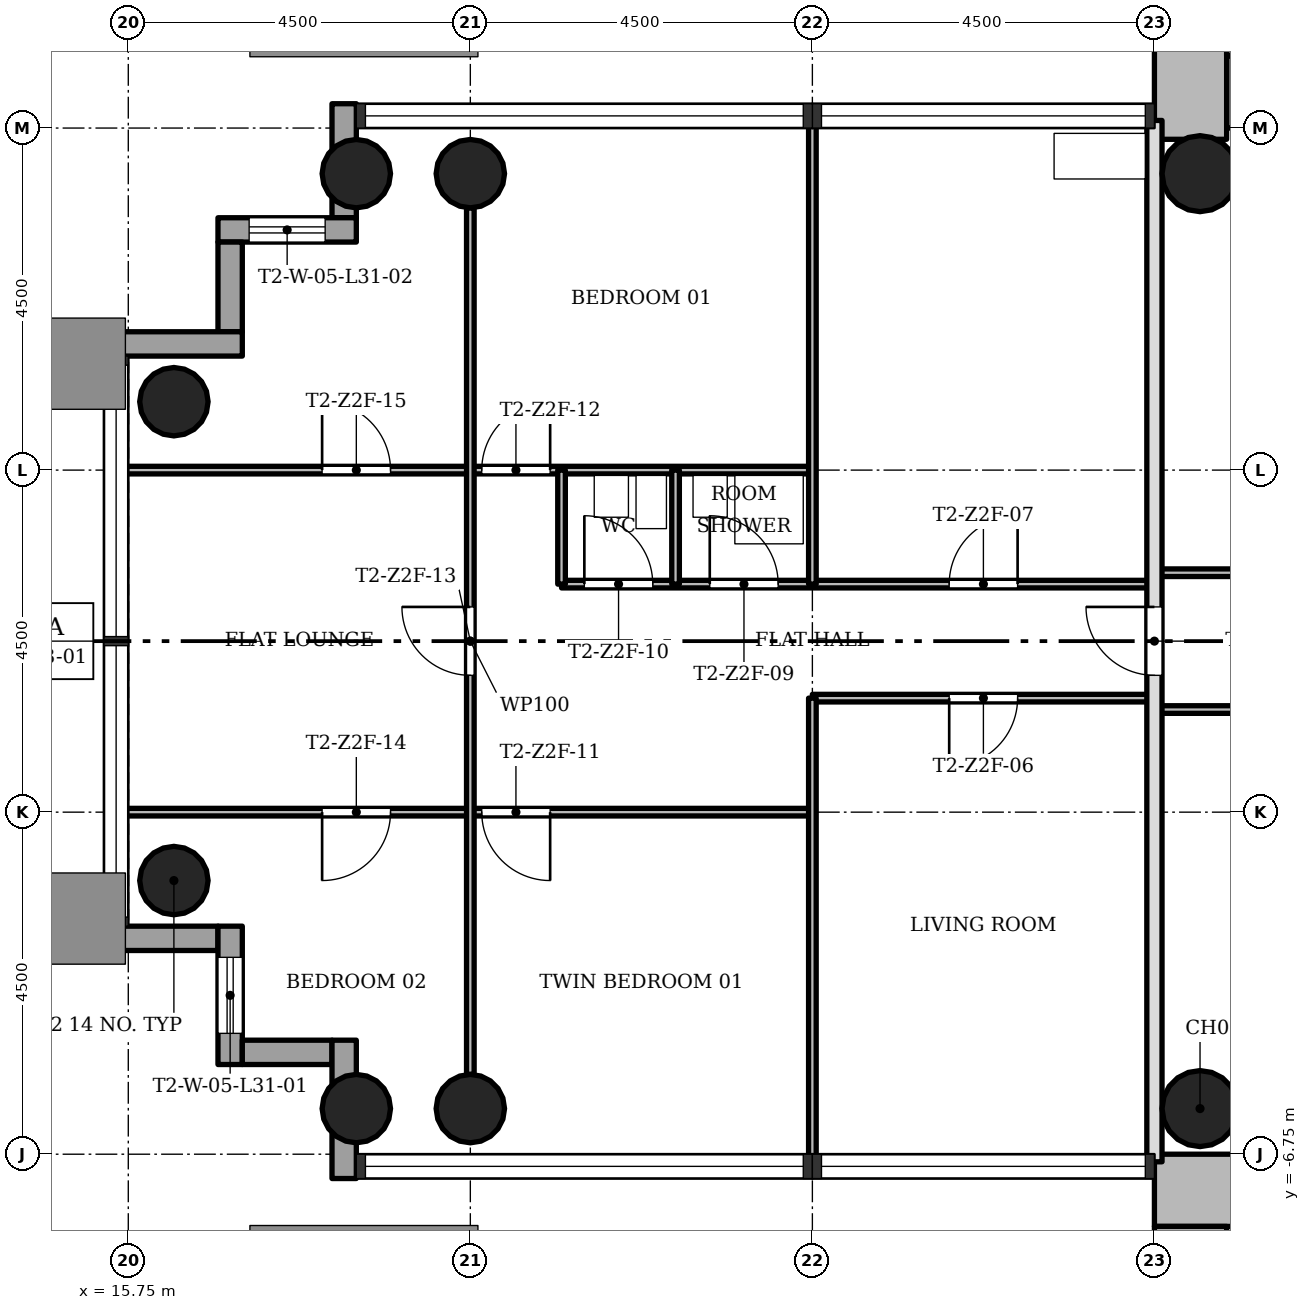
"""IFC4 building model, lengths in metres.
Left out: names, types, materials, properties, quantities, classifications, styles, units other than length and angle.
Written with IfcOpenShell. Run it as: python <this file> out.ifc"""

import sys

from ifc_helpers import new_model, si_unit, direction, frame, frame_2d, origin, origin_2d, place, context, subcontext, project, spatial, rectangle, hollow_circle, extrude, element, fill, save


model = new_model("IFC4")
c1 = context("Model", 3, precision=1e-05, world=origin(), true_north=direction((0.0, 1.0)))
c2 = subcontext(c1, "Body", "Model", "MODEL_VIEW")
j1 = project(units=[si_unit("LENGTHUNIT", "METRE"), si_unit("PLANEANGLEUNIT", "RADIAN")], contexts=[c1])
p1 = place(None, origin())
s1 = spatial("IfcSite", under=j1, at=p1, CompositionType="ELEMENT")
p2 = place(p1, origin())
s2 = spatial("IfcBuilding", under=s1, at=p2, CompositionType="ELEMENT")
p3 = place(p2, frame((0.0, 0.0, 114.0)))
s3 = spatial("IfcBuildingStorey", under=s2, at=p3, CompositionType="ELEMENT", Elevation=114.0)
p4 = place(p3, frame((30.2, 7.225, 0.0), z_axis=(0.0, 0.0, 1.0), x_axis=(1.0, 0.0, 0.0)))
e1 = element("IfcWall", 1, at=p4, inside=s3, PredefinedType="SHEAR", context=c2, shape_type="SweptSolid", body=[
    extrude(rectangle(XDim=12.55, YDim=0.95, at=frame_2d((6.275, 0.0))), origin(), (0.0, 0.0, 1.0), 3.4),
])
p5 = place(p4, frame((4.9, 0.0, 0.0)))
e2 = element("IfcOpeningElement", 2, at=p5, cuts=e1, PredefinedType="OPENING", context=c2, shape_type="SweptSolid", body=[
    extrude(rectangle(XDim=1.8, YDim=2.1, at=frame_2d((0.9, 1.05))), frame((0.0, 0.485, 0.0), z_axis=(0.0, -1.0, 0.0), x_axis=(1.0, 0.0, 0.0)), (0.0, 0.0, 1.0), 0.97),
])
p6 = place(p3, frame((29.725, 15.298, 0.0), z_axis=(0.0, 0.0, 1.0), x_axis=(0.0, -1.0, 0.0)))
e3 = element("IfcWall", 3, at=p6, inside=s3, PredefinedType="SHEAR", context=c2, shape_type="SweptSolid", body=[
    extrude(rectangle(XDim=8.696, YDim=0.95, at=frame_2d((4.348, 0.0))), origin(), (0.0, 0.0, 1.0), 3.4),
])
p7 = place(p3, frame((41.8, -7.225, 0.0), z_axis=(0.0, 0.0, 1.0), x_axis=(-1.0, 0.0, 0.0)))
e4 = element("IfcWall", 4, at=p7, inside=s3, PredefinedType="SHEAR", context=c2, shape_type="SweptSolid", body=[
    extrude(rectangle(XDim=12.55, YDim=0.95, at=frame_2d((6.275, 0.0))), origin(), (0.0, 0.0, 1.0), 3.4),
])
p8 = place(p7, frame((4.9, 0.0, 0.0)))
e5 = element("IfcOpeningElement", 5, at=p8, cuts=e4, PredefinedType="OPENING", context=c2, shape_type="SweptSolid", body=[
    extrude(rectangle(XDim=1.8, YDim=2.1, at=frame_2d((0.9, 1.05))), frame((0.0, 0.485, 0.0), z_axis=(0.0, -1.0, 0.0), x_axis=(1.0, 0.0, 0.0)), (0.0, 0.0, 1.0), 0.97),
])
p9 = place(p3, frame((29.725, -7.7, 0.0), z_axis=(0.0, 0.0, 1.0), x_axis=(0.0, -1.0, 0.0)))
e6 = element("IfcWall", 6, at=p9, inside=s3, PredefinedType="SHEAR", context=c2, shape_type="SweptSolid", body=[
    extrude(rectangle(XDim=8.05, YDim=0.95, at=frame_2d((4.025, 0.0))), origin(), (0.0, 0.0, 1.0), 3.4),
])
for number, where, z_axis, x_axis in (
    (7, (20.25, 6.15, 0.0), (0.0, 0.0, 1.0), (1.0, 0.0, 0.0)),
    (8, (20.25, -6.15, 0.0), (0.0, 0.0, 1.0), (1.0, 0.0, 0.0)),
    (9, (18.75, 6.15, 0.0), (0.0, 0.0, 1.0), (1.0, 0.0, 0.0)),
    (10, (18.75, -6.15, 0.0), (0.0, 0.0, 1.0), (1.0, 0.0, 0.0)),
    (11, (16.35, 3.15, 0.0), (0.0, 0.0, 1.0), (1.0, 0.0, 0.0)),
    (12, (16.35, -3.15, 0.0), (0.0, 0.0, 1.0), (1.0, 0.0, 0.0)),
):
    element("IfcColumn", number, at=place(p3, frame(where, z_axis=z_axis, x_axis=x_axis)), inside=s3, PredefinedType="COLUMN", context=c2, shape_type="SweptSolid", body=[
        extrude(hollow_circle(Radius=0.45, WallThickness=0.032, at=origin_2d()), origin(), (0.0, 0.0, 1.0), 3.4),
    ])
for number, where, z_axis, x_axis in (
    (13, (29.85, 6.15, 0.0), (0.0, 0.0, 1.0), (1.0, 0.0, 0.0)),
    (14, (29.85, -6.15, 0.0), (0.0, 0.0, 1.0), (1.0, 0.0, 0.0)),
):
    element("IfcColumn", number, at=place(p3, frame(where, z_axis=z_axis, x_axis=x_axis)), inside=s3, PredefinedType="COLUMN", context=c2, shape_type="SweptSolid", body=[
        extrude(hollow_circle(Radius=0.5, WallThickness=0.036, at=origin_2d()), origin(), (0.0, 0.0, 1.0), 3.4),
    ])
p10 = place(p3, frame((18.59, 7.07, -0.3), z_axis=(0.0, 0.0, 1.0), x_axis=(0.0, -1.0, 0.0)))
e15 = element("IfcWall", 15, at=p10, inside=s3, PredefinedType="STANDARD", context=c2, shape_type="SweptSolid", body=[
    extrude(rectangle(XDim=1.5, YDim=0.32, at=frame_2d((0.75, 0.0))), origin(), (0.0, 0.0, 1.0), 3.4),
])
p11 = place(p3, frame((18.75, 5.41, -0.3), z_axis=(0.0, 0.0, 1.0), x_axis=(-1.0, 0.0, 0.0)))
e16 = element("IfcWall", 16, at=p11, inside=s3, PredefinedType="STANDARD", context=c2, shape_type="SweptSolid", body=[
    extrude(rectangle(XDim=1.82, YDim=0.32, at=frame_2d((0.91, 0.0))), origin(), (0.0, 0.0, 1.0), 3.4),
])
p12 = place(p11, frame((0.41, 0.0, 1.2)))
e17 = element("IfcOpeningElement", 17, at=p12, cuts=e16, PredefinedType="OPENING", context=c2, shape_type="SweptSolid", body=[
    extrude(rectangle(XDim=1.0, YDim=1.5, at=frame_2d((0.5, 0.75))), frame((0.0, 0.17, 0.0), z_axis=(0.0, -1.0, 0.0), x_axis=(1.0, 0.0, 0.0)), (0.0, 0.0, 1.0), 0.34),
])
p13 = place(p3, frame((17.09, 5.25, -0.3), z_axis=(0.0, 0.0, 1.0), x_axis=(0.0, -1.0, 0.0)))
e18 = element("IfcWall", 18, at=p13, inside=s3, PredefinedType="STANDARD", context=c2, shape_type="SweptSolid", body=[
    extrude(rectangle(XDim=1.18, YDim=0.32, at=frame_2d((0.59, 0.0))), origin(), (0.0, 0.0, 1.0), 3.4),
])
p14 = place(p3, frame((17.25, 3.91, -0.3), z_axis=(0.0, 0.0, 1.0), x_axis=(-1.0, 0.0, 0.0)))
e19 = element("IfcWall", 19, at=p14, inside=s3, PredefinedType="STANDARD", context=c2, shape_type="SweptSolid", body=[
    extrude(rectangle(XDim=1.82, YDim=0.32, at=frame_2d((0.91, 0.0))), origin(), (0.0, 0.0, 1.0), 3.4),
])
p15 = place(p3, frame((15.43, -3.91, -0.3), z_axis=(0.0, 0.0, 1.0), x_axis=(1.0, 0.0, 0.0)))
e20 = element("IfcWall", 20, at=p15, inside=s3, PredefinedType="STANDARD", context=c2, shape_type="SweptSolid", body=[
    extrude(rectangle(XDim=1.5, YDim=0.32, at=frame_2d((0.75, 0.0))), origin(), (0.0, 0.0, 1.0), 3.4),
])
p16 = place(p3, frame((17.09, -3.75, -0.3), z_axis=(0.0, 0.0, 1.0), x_axis=(0.0, -1.0, 0.0)))
e21 = element("IfcWall", 21, at=p16, inside=s3, PredefinedType="STANDARD", context=c2, shape_type="SweptSolid", body=[
    extrude(rectangle(XDim=1.82, YDim=0.32, at=frame_2d((0.91, 0.0))), origin(), (0.0, 0.0, 1.0), 3.4),
])
p17 = place(p16, frame((0.41, 0.0, 1.2)))
e22 = element("IfcOpeningElement", 22, at=p17, cuts=e21, PredefinedType="OPENING", context=c2, shape_type="SweptSolid", body=[
    extrude(rectangle(XDim=1.0, YDim=1.5, at=frame_2d((0.5, 0.75))), frame((0.0, 0.17, 0.0), z_axis=(0.0, -1.0, 0.0), x_axis=(1.0, 0.0, 0.0)), (0.0, 0.0, 1.0), 0.34),
])
p18 = place(p3, frame((17.25, -5.41, -0.3), z_axis=(0.0, 0.0, 1.0), x_axis=(1.0, 0.0, 0.0)))
e23 = element("IfcWall", 23, at=p18, inside=s3, PredefinedType="STANDARD", context=c2, shape_type="SweptSolid", body=[
    extrude(rectangle(XDim=1.18, YDim=0.32, at=frame_2d((0.59, 0.0))), origin(), (0.0, 0.0, 1.0), 3.4),
])
p19 = place(p3, frame((18.59, -5.25, -0.3), z_axis=(0.0, 0.0, 1.0), x_axis=(0.0, -1.0, 0.0)))
e24 = element("IfcWall", 24, at=p19, inside=s3, PredefinedType="STANDARD", context=c2, shape_type="SweptSolid", body=[
    extrude(rectangle(XDim=1.82, YDim=0.32, at=frame_2d((0.91, 0.0))), origin(), (0.0, 0.0, 1.0), 3.4),
])
p20 = place(p3, frame((24.75, -2.25, 0.0), z_axis=(0.0, 0.0, 1.0), x_axis=(-1.0, 0.0, 0.0)))
e25 = element("IfcWall", 25, at=p20, inside=s3, PredefinedType="PARTITIONING", context=c2, shape_type="SweptSolid", body=[
    extrude(rectangle(XDim=9.1, YDim=0.1, at=frame_2d((4.55, 0.0))), origin(), (0.0, 0.0, 1.0), 3.0),
])
p21 = place(p20, frame((3.45, 0.0, 0.0)))
e26 = element("IfcOpeningElement", 26, at=p21, cuts=e25, PredefinedType="OPENING", context=c2, shape_type="SweptSolid", body=[
    extrude(rectangle(XDim=0.9, YDim=2.1, at=frame_2d((0.45, 1.05))), frame((0.0, 0.06, 0.0), z_axis=(0.0, -1.0, 0.0), x_axis=(1.0, 0.0, 0.0)), (0.0, 0.0, 1.0), 0.12),
])
p22 = place(p20, frame((5.55, 0.0, 0.0)))
e27 = element("IfcOpeningElement", 27, at=p22, cuts=e25, PredefinedType="OPENING", context=c2, shape_type="SweptSolid", body=[
    extrude(rectangle(XDim=0.9, YDim=2.1, at=frame_2d((0.45, 1.05))), frame((0.0, 0.06, 0.0), z_axis=(0.0, -1.0, 0.0), x_axis=(1.0, 0.0, 0.0)), (0.0, 0.0, 1.0), 0.12),
])
p23 = place(p3, frame((34.5, -0.9, 0.0), z_axis=(0.0, 0.0, 1.0), x_axis=(-1.0, 0.0, 0.0)))
e28 = element("IfcWall", 28, at=p23, inside=s3, PredefinedType="PARTITIONING", context=c2, shape_type="SweptSolid", body=[
    extrude(rectangle(XDim=5.25, YDim=0.1, at=frame_2d((2.625, 0.0))), origin(), (0.0, 0.0, 1.0), 3.0),
])
p24 = place(p3, frame((29.25, -0.75, 0.0), z_axis=(0.0, 0.0, 1.0), x_axis=(-1.0, 0.0, 0.0)))
e29 = element("IfcWall", 29, at=p24, inside=s3, PredefinedType="PARTITIONING", context=c2, shape_type="SweptSolid", body=[
    extrude(rectangle(XDim=4.5, YDim=0.1, at=frame_2d((2.25, 0.0))), origin(), (0.0, 0.0, 1.0), 3.0),
])
p25 = place(p24, frame((1.8, 0.0, 0.0)))
e30 = element("IfcOpeningElement", 30, at=p25, cuts=e29, PredefinedType="OPENING", context=c2, shape_type="SweptSolid", body=[
    extrude(rectangle(XDim=0.9, YDim=2.1, at=frame_2d((0.45, 1.05))), frame((0.0, 0.06, 0.0), z_axis=(0.0, -1.0, 0.0), x_axis=(1.0, 0.0, 0.0)), (0.0, 0.0, 1.0), 0.12),
])
p26 = place(p3, frame((29.25, 0.75, 0.0), z_axis=(0.0, 0.0, 1.0), x_axis=(-1.0, 0.0, 0.0)))
e31 = element("IfcWall", 31, at=p26, inside=s3, PredefinedType="PARTITIONING", context=c2, shape_type="SweptSolid", body=[
    extrude(rectangle(XDim=7.8, YDim=0.1, at=frame_2d((3.9, 0.0))), origin(), (0.0, 0.0, 1.0), 3.0),
])
p27 = place(p26, frame((1.8, 0.0, 0.0)))
e32 = element("IfcOpeningElement", 32, at=p27, cuts=e31, PredefinedType="OPENING", context=c2, shape_type="SweptSolid", body=[
    extrude(rectangle(XDim=0.9, YDim=2.1, at=frame_2d((0.45, 1.05))), frame((0.0, 0.06, 0.0), z_axis=(0.0, -1.0, 0.0), x_axis=(1.0, 0.0, 0.0)), (0.0, 0.0, 1.0), 0.12),
])
p28 = place(p26, frame((4.95, 0.0, 0.0)))
e33 = element("IfcOpeningElement", 33, at=p28, cuts=e31, PredefinedType="OPENING", context=c2, shape_type="SweptSolid", body=[
    extrude(rectangle(XDim=0.9, YDim=2.1, at=frame_2d((0.45, 1.05))), frame((0.0, 0.06, 0.0), z_axis=(0.0, -1.0, 0.0), x_axis=(1.0, 0.0, 0.0)), (0.0, 0.0, 1.0), 0.12),
])
p29 = place(p26, frame((6.6, 0.0, 0.0)))
e34 = element("IfcOpeningElement", 34, at=p29, cuts=e31, PredefinedType="OPENING", context=c2, shape_type="SweptSolid", body=[
    extrude(rectangle(XDim=0.9, YDim=2.1, at=frame_2d((0.45, 1.05))), frame((0.0, 0.06, 0.0), z_axis=(0.0, -1.0, 0.0), x_axis=(1.0, 0.0, 0.0)), (0.0, 0.0, 1.0), 0.12),
])
p30 = place(p3, frame((34.5, 0.9, 0.0), z_axis=(0.0, 0.0, 1.0), x_axis=(-1.0, 0.0, 0.0)))
e35 = element("IfcWall", 35, at=p30, inside=s3, PredefinedType="PARTITIONING", context=c2, shape_type="SweptSolid", body=[
    extrude(rectangle(XDim=5.25, YDim=0.1, at=frame_2d((2.625, 0.0))), origin(), (0.0, 0.0, 1.0), 3.0),
])
p31 = place(p30, frame((0.75, 0.0, 0.0)))
e36 = element("IfcOpeningElement", 36, at=p31, cuts=e35, PredefinedType="OPENING", context=c2, shape_type="SweptSolid", body=[
    extrude(rectangle(XDim=0.9, YDim=2.1, at=frame_2d((0.45, 1.05))), frame((0.0, 0.06, 0.0), z_axis=(0.0, -1.0, 0.0), x_axis=(1.0, 0.0, 0.0)), (0.0, 0.0, 1.0), 0.12),
])
p32 = place(p3, frame((24.75, 2.25, 0.0), z_axis=(0.0, 0.0, 1.0), x_axis=(-1.0, 0.0, 0.0)))
e37 = element("IfcWall", 37, at=p32, inside=s3, PredefinedType="PARTITIONING", context=c2, shape_type="SweptSolid", body=[
    extrude(rectangle(XDim=9.1, YDim=0.1, at=frame_2d((4.55, 0.0))), origin(), (0.0, 0.0, 1.0), 3.0),
])
p33 = place(p32, frame((3.45, 0.0, 0.0)))
e38 = element("IfcOpeningElement", 38, at=p33, cuts=e37, PredefinedType="OPENING", context=c2, shape_type="SweptSolid", body=[
    extrude(rectangle(XDim=0.9, YDim=2.1, at=frame_2d((0.45, 1.05))), frame((0.0, 0.06, 0.0), z_axis=(0.0, -1.0, 0.0), x_axis=(1.0, 0.0, 0.0)), (0.0, 0.0, 1.0), 0.12),
])
p34 = place(p32, frame((5.55, 0.0, 0.0)))
e39 = element("IfcOpeningElement", 39, at=p34, cuts=e37, PredefinedType="OPENING", context=c2, shape_type="SweptSolid", body=[
    extrude(rectangle(XDim=0.9, YDim=2.1, at=frame_2d((0.45, 1.05))), frame((0.0, 0.06, 0.0), z_axis=(0.0, -1.0, 0.0), x_axis=(1.0, 0.0, 0.0)), (0.0, 0.0, 1.0), 0.12),
])
p35 = place(p3, frame((29.25, -6.85, 0.0), z_axis=(0.0, 0.0, 1.0), x_axis=(0.0, 1.0, 0.0)))
e40 = element("IfcWall", 40, at=p35, inside=s3, PredefinedType="SOLIDWALL", context=c2, shape_type="SweptSolid", body=[
    extrude(rectangle(XDim=13.7, YDim=0.2, at=frame_2d((6.85, 0.0))), origin(), (0.0, 0.0, 1.0), 3.0),
])
p36 = place(p35, frame((6.4, 0.0, 0.0)))
e41 = element("IfcOpeningElement", 41, at=p36, cuts=e40, PredefinedType="OPENING", context=c2, shape_type="SweptSolid", body=[
    extrude(rectangle(XDim=0.9, YDim=2.1, at=frame_2d((0.45, 1.05))), frame((0.0, 0.11, 0.0), z_axis=(0.0, -1.0, 0.0), x_axis=(1.0, 0.0, 0.0)), (0.0, 0.0, 1.0), 0.22),
])
for number, where, z_axis, x_axis in (
    (42, (24.75, -6.85, 0.0), (0.0, 0.0, 1.0), (0.0, 1.0, 0.0)),
    (43, (24.75, 0.75, 0.0), (0.0, 0.0, 1.0), (0.0, 1.0, 0.0)),
):
    element("IfcWall", number, at=place(p3, frame(where, z_axis=z_axis, x_axis=x_axis)), inside=s3, PredefinedType="PARTITIONING", context=c2, shape_type="SweptSolid", body=[
        extrude(rectangle(XDim=6.1, YDim=0.1, at=frame_2d((3.05, 0.0))), origin(), (0.0, 0.0, 1.0), 3.0),
    ])
for number, where, z_axis, x_axis in (
    (44, (22.95, 0.75, 0.0), (0.0, 0.0, 1.0), (0.0, 1.0, 0.0)),
    (45, (21.45, 0.75, 0.0), (0.0, 0.0, 1.0), (0.0, 1.0, 0.0)),
):
    element("IfcWall", number, at=place(p3, frame(where, z_axis=z_axis, x_axis=x_axis)), inside=s3, PredefinedType="PARTITIONING", context=c2, shape_type="SweptSolid", body=[
        extrude(rectangle(XDim=1.5, YDim=0.1, at=frame_2d((0.75, 0.0))), origin(), (0.0, 0.0, 1.0), 3.0),
    ])
p37 = place(p3, frame((20.25, -5.7, 0.0), z_axis=(0.0, 0.0, 1.0), x_axis=(0.0, 1.0, 0.0)))
e46 = element("IfcWall", 46, at=p37, inside=s3, PredefinedType="PARTITIONING", context=c2, shape_type="SweptSolid", body=[
    extrude(rectangle(XDim=11.4, YDim=0.1, at=frame_2d((5.7, 0.0))), origin(), (0.0, 0.0, 1.0), 3.0),
])
p38 = place(p37, frame((5.25, 0.0, 0.0)))
e47 = element("IfcOpeningElement", 47, at=p38, cuts=e46, PredefinedType="OPENING", context=c2, shape_type="SweptSolid", body=[
    extrude(rectangle(XDim=0.9, YDim=2.1, at=frame_2d((0.45, 1.05))), frame((0.0, 0.06, 0.0), z_axis=(0.0, -1.0, 0.0), x_axis=(1.0, 0.0, 0.0)), (0.0, 0.0, 1.0), 0.12),
])
p39 = place(p3, frame((34.1, 7.825, 0.0), z_axis=(0.0, 0.0, 1.0), x_axis=(-1.0, 0.0, 0.0)))
e48 = element("IfcWall", 48, at=p39, inside=s3, PredefinedType="SHEAR", context=c2, shape_type="SweptSolid", body=[
    extrude(rectangle(XDim=3.9, YDim=0.25, at=frame_2d((1.95, 0.0))), origin(), (0.0, 0.0, 1.0), 3.4),
])
p40 = place(p25, origin())
e49 = element("IfcDoor", 49, at=p40, inside=s3, OperationType="SINGLE_SWING_LEFT", PredefinedType="DOOR", context=c2, shape_type="SweptSolid", body=[
    extrude(rectangle(XDim=0.9, YDim=2.1, at=frame_2d((0.45, 1.05))), frame((0.0, 0.025, 0.0), z_axis=(0.0, -1.0, 0.0), x_axis=(1.0, 0.0, 0.0)), (0.0, 0.0, 1.0), 0.05),
])
fill(e30, e49)
p41 = place(p27, origin())
e50 = element("IfcDoor", 50, at=p41, inside=s3, OperationType="SINGLE_SWING_LEFT", PredefinedType="DOOR", context=c2, shape_type="SweptSolid", body=[
    extrude(rectangle(XDim=0.9, YDim=2.1, at=frame_2d((0.45, 1.05))), frame((0.0, 0.025, 0.0), z_axis=(0.0, -1.0, 0.0), x_axis=(1.0, 0.0, 0.0)), (0.0, 0.0, 1.0), 0.05),
])
fill(e32, e50)
p42 = place(p36, origin())
e51 = element("IfcDoor", 51, at=p42, inside=s3, OperationType="SINGLE_SWING_LEFT", PredefinedType="DOOR", context=c2, shape_type="SweptSolid", body=[
    extrude(rectangle(XDim=0.9, YDim=2.1, at=frame_2d((0.45, 1.05))), frame((0.0, 0.025, 0.0), z_axis=(0.0, -1.0, 0.0), x_axis=(1.0, 0.0, 0.0)), (0.0, 0.0, 1.0), 0.05),
])
fill(e41, e51)
p43 = place(p28, origin())
e52 = element("IfcDoor", 52, at=p43, inside=s3, OperationType="SINGLE_SWING_RIGHT", PredefinedType="DOOR", context=c2, shape_type="SweptSolid", body=[
    extrude(rectangle(XDim=0.9, YDim=2.1, at=frame_2d((0.45, 1.05))), frame((0.0, 0.025, 0.0), z_axis=(0.0, -1.0, 0.0), x_axis=(1.0, 0.0, 0.0)), (0.0, 0.0, 1.0), 0.05),
])
fill(e33, e52)
p44 = place(p29, origin())
e53 = element("IfcDoor", 53, at=p44, inside=s3, OperationType="SINGLE_SWING_RIGHT", PredefinedType="DOOR", context=c2, shape_type="SweptSolid", body=[
    extrude(rectangle(XDim=0.9, YDim=2.1, at=frame_2d((0.45, 1.05))), frame((0.0, 0.025, 0.0), z_axis=(0.0, -1.0, 0.0), x_axis=(1.0, 0.0, 0.0)), (0.0, 0.0, 1.0), 0.05),
])
fill(e34, e53)
p45 = place(p21, origin())
e54 = element("IfcDoor", 54, at=p45, inside=s3, OperationType="SINGLE_SWING_RIGHT", PredefinedType="DOOR", context=c2, shape_type="SweptSolid", body=[
    extrude(rectangle(XDim=0.9, YDim=2.1, at=frame_2d((0.45, 1.05))), frame((0.0, 0.025, 0.0), z_axis=(0.0, -1.0, 0.0), x_axis=(1.0, 0.0, 0.0)), (0.0, 0.0, 1.0), 0.05),
])
fill(e26, e54)
p46 = place(p33, origin())
e55 = element("IfcDoor", 55, at=p46, inside=s3, OperationType="SINGLE_SWING_LEFT", PredefinedType="DOOR", context=c2, shape_type="SweptSolid", body=[
    extrude(rectangle(XDim=0.9, YDim=2.1, at=frame_2d((0.45, 1.05))), frame((0.0, 0.025, 0.0), z_axis=(0.0, -1.0, 0.0), x_axis=(1.0, 0.0, 0.0)), (0.0, 0.0, 1.0), 0.05),
])
fill(e38, e55)
p47 = place(p38, origin())
e56 = element("IfcDoor", 56, at=p47, inside=s3, OperationType="SINGLE_SWING_LEFT", PredefinedType="DOOR", context=c2, shape_type="SweptSolid", body=[
    extrude(rectangle(XDim=0.9, YDim=2.1, at=frame_2d((0.45, 1.05))), frame((0.0, 0.025, 0.0), z_axis=(0.0, -1.0, 0.0), x_axis=(1.0, 0.0, 0.0)), (0.0, 0.0, 1.0), 0.05),
])
fill(e47, e56)
p48 = place(p22, origin())
e57 = element("IfcDoor", 57, at=p48, inside=s3, OperationType="SINGLE_SWING_LEFT", PredefinedType="DOOR", context=c2, shape_type="SweptSolid", body=[
    extrude(rectangle(XDim=0.9, YDim=2.1, at=frame_2d((0.45, 1.05))), frame((0.0, 0.025, 0.0), z_axis=(0.0, -1.0, 0.0), x_axis=(1.0, 0.0, 0.0)), (0.0, 0.0, 1.0), 0.05),
])
fill(e27, e57)
p49 = place(p34, origin())
e58 = element("IfcDoor", 58, at=p49, inside=s3, OperationType="SINGLE_SWING_RIGHT", PredefinedType="DOOR", context=c2, shape_type="SweptSolid", body=[
    extrude(rectangle(XDim=0.9, YDim=2.1, at=frame_2d((0.45, 1.05))), frame((0.0, 0.025, 0.0), z_axis=(0.0, -1.0, 0.0), x_axis=(1.0, 0.0, 0.0)), (0.0, 0.0, 1.0), 0.05),
])
fill(e39, e58)
p50 = place(p17, origin())
e59 = element("IfcWindow", 59, at=p50, inside=s3, PartitioningType="SINGLE_PANEL", PredefinedType="WINDOW", context=c2, shape_type="SweptSolid", body=[
    extrude(rectangle(XDim=1.0, YDim=1.5, at=frame_2d((0.5, 0.75))), frame((0.0, 0.03, 0.0), z_axis=(0.0, -1.0, 0.0), x_axis=(1.0, 0.0, 0.0)), (0.0, 0.0, 1.0), 0.06),
])
fill(e22, e59)
p51 = place(p12, origin())
e60 = element("IfcWindow", 60, at=p51, inside=s3, PartitioningType="SINGLE_PANEL", PredefinedType="WINDOW", context=c2, shape_type="SweptSolid", body=[
    extrude(rectangle(XDim=1.0, YDim=1.5, at=frame_2d((0.5, 0.75))), frame((0.0, 0.03, 0.0), z_axis=(0.0, -1.0, 0.0), x_axis=(1.0, 0.0, 0.0)), (0.0, 0.0, 1.0), 0.06),
])
fill(e17, e60)
save(model, sys.argv[1])
